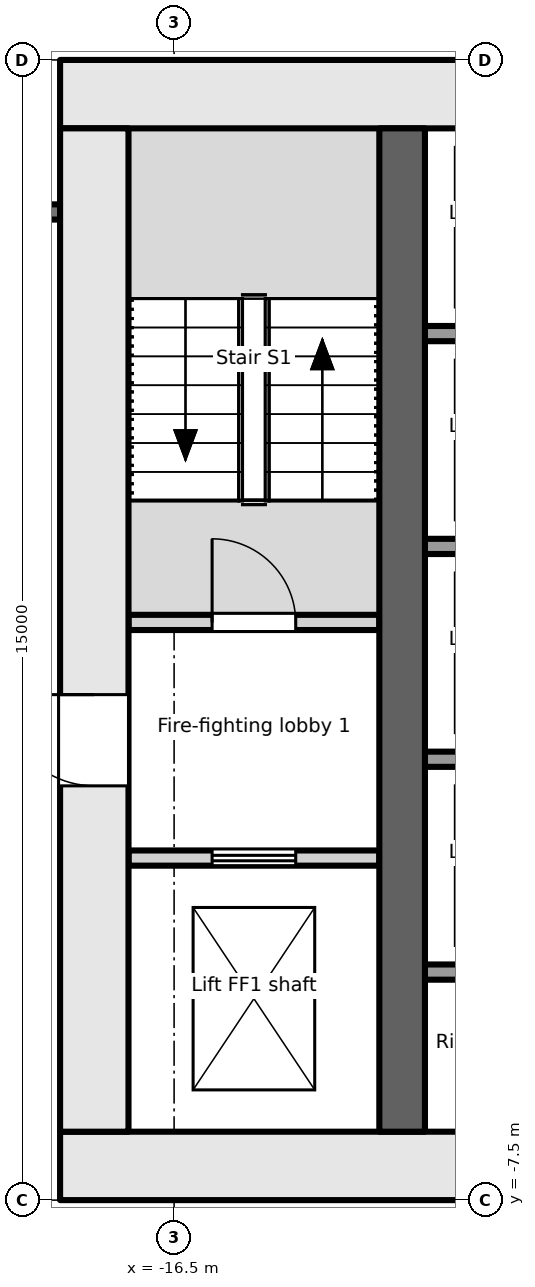
"""IFC4 building model, lengths in metres.
Left out: names, types, materials, properties, quantities, classifications, styles, units other than length and angle.
Written with IfcOpenShell. Run it as: python <this file> out.ifc"""

import sys

from ifc_helpers import new_model, si_unit, direction, frame, frame_2d, origin, place, context, subcontext, project, spatial, rectangle, extrude, element, fill, save


model = new_model("IFC4")
c1 = context("Model", 3, precision=1e-05, world=origin(), true_north=direction((0.0, 1.0)))
c2 = subcontext(c1, "Body", "Model", "MODEL_VIEW")
j1 = project(units=[si_unit("LENGTHUNIT", "METRE"), si_unit("PLANEANGLEUNIT", "RADIAN")], contexts=[c1])
p1 = place(None, origin())
s1 = spatial("IfcSite", under=j1, at=p1, CompositionType="ELEMENT")
p2 = place(p1, origin())
s2 = spatial("IfcBuilding", under=s1, at=p2, CompositionType="ELEMENT")
p3 = place(p2, frame((0.0, 0.0, -5.5)))
s3 = spatial("IfcBuildingStorey", under=s2, at=p3, CompositionType="ELEMENT", Elevation=-5.5)
p4 = place(p3, frame((-18.0, -7.05, -0.2), z_axis=(0.0, 0.0, 1.0), x_axis=(1.0, 0.0, 0.0)))
e1 = element("IfcWall", 1, at=p4, inside=s3, PredefinedType="SHEAR", context=c2, shape_type="SweptSolid", body=[
    extrude(rectangle(XDim=36.0, YDim=0.9, at=frame_2d((18.0, 0.0))), origin(), (0.0, 0.0, 1.0), 5.5),
])
p5 = place(p4, frame((7.8, 0.0, 0.2)))
e2 = element("IfcOpeningElement", 2, at=p5, cuts=e1, PredefinedType="OPENING", context=c2, shape_type="SweptSolid", body=[
    extrude(rectangle(XDim=2.4, YDim=2.1, at=frame_2d((1.2, 1.05))), frame((0.0, 0.46, 0.0), z_axis=(0.0, -1.0, 0.0), x_axis=(1.0, 0.0, 0.0)), (0.0, 0.0, 1.0), 0.921),
])
p6 = place(p4, frame((17.4, 0.0, 0.2)))
e3 = element("IfcOpeningElement", 3, at=p6, cuts=e1, PredefinedType="OPENING", context=c2, shape_type="SweptSolid", body=[
    extrude(rectangle(XDim=1.2, YDim=2.1, at=frame_2d((0.6, 1.05))), frame((0.0, 0.46, 0.0), z_axis=(0.0, -1.0, 0.0), x_axis=(1.0, 0.0, 0.0)), (0.0, 0.0, 1.0), 0.921),
])
p7 = place(p4, frame((26.1, 0.0, 0.2)))
e4 = element("IfcOpeningElement", 4, at=p7, cuts=e1, PredefinedType="OPENING", context=c2, shape_type="SweptSolid", body=[
    extrude(rectangle(XDim=2.4, YDim=2.1, at=frame_2d((1.2, 1.05))), frame((0.0, 0.46, 0.0), z_axis=(0.0, -1.0, 0.0), x_axis=(1.0, 0.0, 0.0)), (0.0, 0.0, 1.0), 0.921),
])
p8 = place(p3, frame((-18.0, 7.05, -0.2), z_axis=(0.0, 0.0, 1.0), x_axis=(1.0, 0.0, 0.0)))
e5 = element("IfcWall", 5, at=p8, inside=s3, PredefinedType="SHEAR", context=c2, shape_type="SweptSolid", body=[
    extrude(rectangle(XDim=36.0, YDim=0.9, at=frame_2d((18.0, 0.0))), origin(), (0.0, 0.0, 1.0), 5.5),
])
p9 = place(p3, frame((-17.55, -6.6, -0.2), z_axis=(0.0, 0.0, 1.0), x_axis=(0.0, 1.0, 0.0)))
e6 = element("IfcWall", 6, at=p9, inside=s3, PredefinedType="SHEAR", context=c2, shape_type="SweptSolid", body=[
    extrude(rectangle(XDim=13.2, YDim=0.9, at=frame_2d((6.6, 0.0))), origin(), (0.0, 0.0, 1.0), 5.5),
])
p10 = place(p9, frame((4.55, 0.0, 0.2)))
e7 = element("IfcOpeningElement", 7, at=p10, cuts=e6, PredefinedType="OPENING", context=c2, shape_type="SweptSolid", body=[
    extrude(rectangle(XDim=1.2, YDim=2.1, at=frame_2d((0.6, 1.05))), frame((0.0, 0.46, 0.0), z_axis=(0.0, -1.0, 0.0), x_axis=(1.0, 0.0, 0.0)), (0.0, 0.0, 1.0), 0.921),
])
p11 = place(p3, frame((-13.5, -6.6, -0.2), z_axis=(0.0, 0.0, 1.0), x_axis=(0.0, 1.0, 0.0)))
e8 = element("IfcWall", 8, at=p11, inside=s3, PredefinedType="SHEAR", context=c2, shape_type="SweptSolid", body=[
    extrude(rectangle(XDim=13.2, YDim=0.6, at=frame_2d((6.6, 0.0))), origin(), (0.0, 0.0, 1.0), 5.5),
])
p12 = place(p3, frame((-17.1, -3.0, 0.0), z_axis=(0.0, 0.0, 1.0), x_axis=(1.0, 0.0, 0.0)))
e9 = element("IfcWall", 9, at=p12, inside=s3, PredefinedType="PARTITIONING", context=c2, shape_type="SweptSolid", body=[
    extrude(rectangle(XDim=3.3, YDim=0.2, at=frame_2d((1.65, 0.0))), origin(), (0.0, 0.0, 1.0), 5.3),
])
p13 = place(p12, frame((1.1, 0.0, 0.0)))
e10 = element("IfcOpeningElement", 10, at=p13, cuts=e9, PredefinedType="OPENING", context=c2, shape_type="SweptSolid", body=[
    extrude(rectangle(XDim=1.1, YDim=2.1, at=frame_2d((0.55, 1.05))), frame((0.0, 0.111, 0.0), z_axis=(0.0, -1.0, 0.0), x_axis=(1.0, 0.0, 0.0)), (0.0, 0.0, 1.0), 0.221),
])
p14 = place(p3, frame((-17.1, 0.1, 0.0), z_axis=(0.0, 0.0, 1.0), x_axis=(1.0, 0.0, 0.0)))
e11 = element("IfcWall", 11, at=p14, inside=s3, PredefinedType="PARTITIONING", context=c2, shape_type="SweptSolid", body=[
    extrude(rectangle(XDim=3.3, YDim=0.2, at=frame_2d((1.65, 0.0))), origin(), (0.0, 0.0, 1.0), 5.3),
])
p15 = place(p14, frame((1.1, 0.0, 0.0)))
e12 = element("IfcOpeningElement", 12, at=p15, cuts=e11, PredefinedType="OPENING", context=c2, shape_type="SweptSolid", body=[
    extrude(rectangle(XDim=1.1, YDim=2.1, at=frame_2d((0.55, 1.05))), frame((0.0, 0.111, 0.0), z_axis=(0.0, -1.0, 0.0), x_axis=(1.0, 0.0, 0.0)), (0.0, 0.0, 1.0), 0.221),
])
for number, where, z_axis, x_axis in (
    (13, (-13.2, -1.7, 0.0), (0.0, 0.0, 1.0), (1.0, 0.0, 0.0)),
    (14, (-13.2, 1.1, 0.0), (0.0, 0.0, 1.0), (1.0, 0.0, 0.0)),
    (15, (-13.2, 3.9, 0.0), (0.0, 0.0, 1.0), (1.0, 0.0, 0.0)),
    (16, (-13.2, -4.5, 0.0), (0.0, 0.0, 1.0), (1.0, 0.0, 0.0)),
):
    element("IfcWall", number, at=place(p3, frame(where, z_axis=z_axis, x_axis=x_axis)), inside=s3, PredefinedType="PARTITIONING", context=c2, shape_type="SweptSolid", body=[
        extrude(rectangle(XDim=2.3, YDim=0.2, at=frame_2d((1.15, 0.0))), origin(), (0.0, 0.0, 1.0), 5.3),
    ])
p16 = place(p3, frame((-20.4, 5.5, 0.0), z_axis=(0.0, 0.0, 1.0), x_axis=(1.0, 0.0, 0.0)))
e17 = element("IfcWall", 17, at=p16, inside=s3, PredefinedType="PARTITIONING", context=c2, shape_type="SweptSolid", body=[
    extrude(rectangle(XDim=2.4, YDim=0.2, at=frame_2d((1.2, 0.0))), origin(), (0.0, 0.0, 1.0), 5.3),
])
p17 = place(p16, frame((0.75, 0.0, 0.0)))
e18 = element("IfcOpeningElement", 18, at=p17, cuts=e17, PredefinedType="OPENING", context=c2, shape_type="SweptSolid", body=[
    extrude(rectangle(XDim=0.9, YDim=2.1, at=frame_2d((0.45, 1.05))), frame((0.0, 0.111, 0.0), z_axis=(0.0, -1.0, 0.0), x_axis=(1.0, 0.0, 0.0)), (0.0, 0.0, 1.0), 0.221),
])
p18 = place(p13, origin())
e19 = element("IfcDoor", 19, at=p18, inside=s3, OperationType="DOUBLE_DOOR_SLIDING", PredefinedType="DOOR", context=c2, shape_type="SweptSolid", body=[
    extrude(rectangle(XDim=1.1, YDim=2.1, at=frame_2d((0.55, 1.05))), frame((0.0, 0.025, 0.0), z_axis=(0.0, -1.0, 0.0), x_axis=(1.0, 0.0, 0.0)), (0.0, 0.0, 1.0), 0.05),
])
fill(e10, e19)
p19 = place(p10, origin())
e20 = element("IfcDoor", 20, at=p19, inside=s3, OperationType="SINGLE_SWING_RIGHT", PredefinedType="DOOR", context=c2, shape_type="SweptSolid", body=[
    extrude(rectangle(XDim=1.2, YDim=2.1, at=frame_2d((0.6, 1.05))), frame((0.0, 0.025, 0.0), z_axis=(0.0, -1.0, 0.0), x_axis=(1.0, 0.0, 0.0)), (0.0, 0.0, 1.0), 0.05),
])
fill(e7, e20)
p20 = place(p15, origin())
e21 = element("IfcDoor", 21, at=p20, inside=s3, OperationType="SINGLE_SWING_LEFT", PredefinedType="DOOR", context=c2, shape_type="SweptSolid", body=[
    extrude(rectangle(XDim=1.1, YDim=2.1, at=frame_2d((0.55, 1.05))), frame((0.0, 0.025, 0.0), z_axis=(0.0, -1.0, 0.0), x_axis=(1.0, 0.0, 0.0)), (0.0, 0.0, 1.0), 0.05),
])
fill(e12, e21)
save(model, sys.argv[1])
